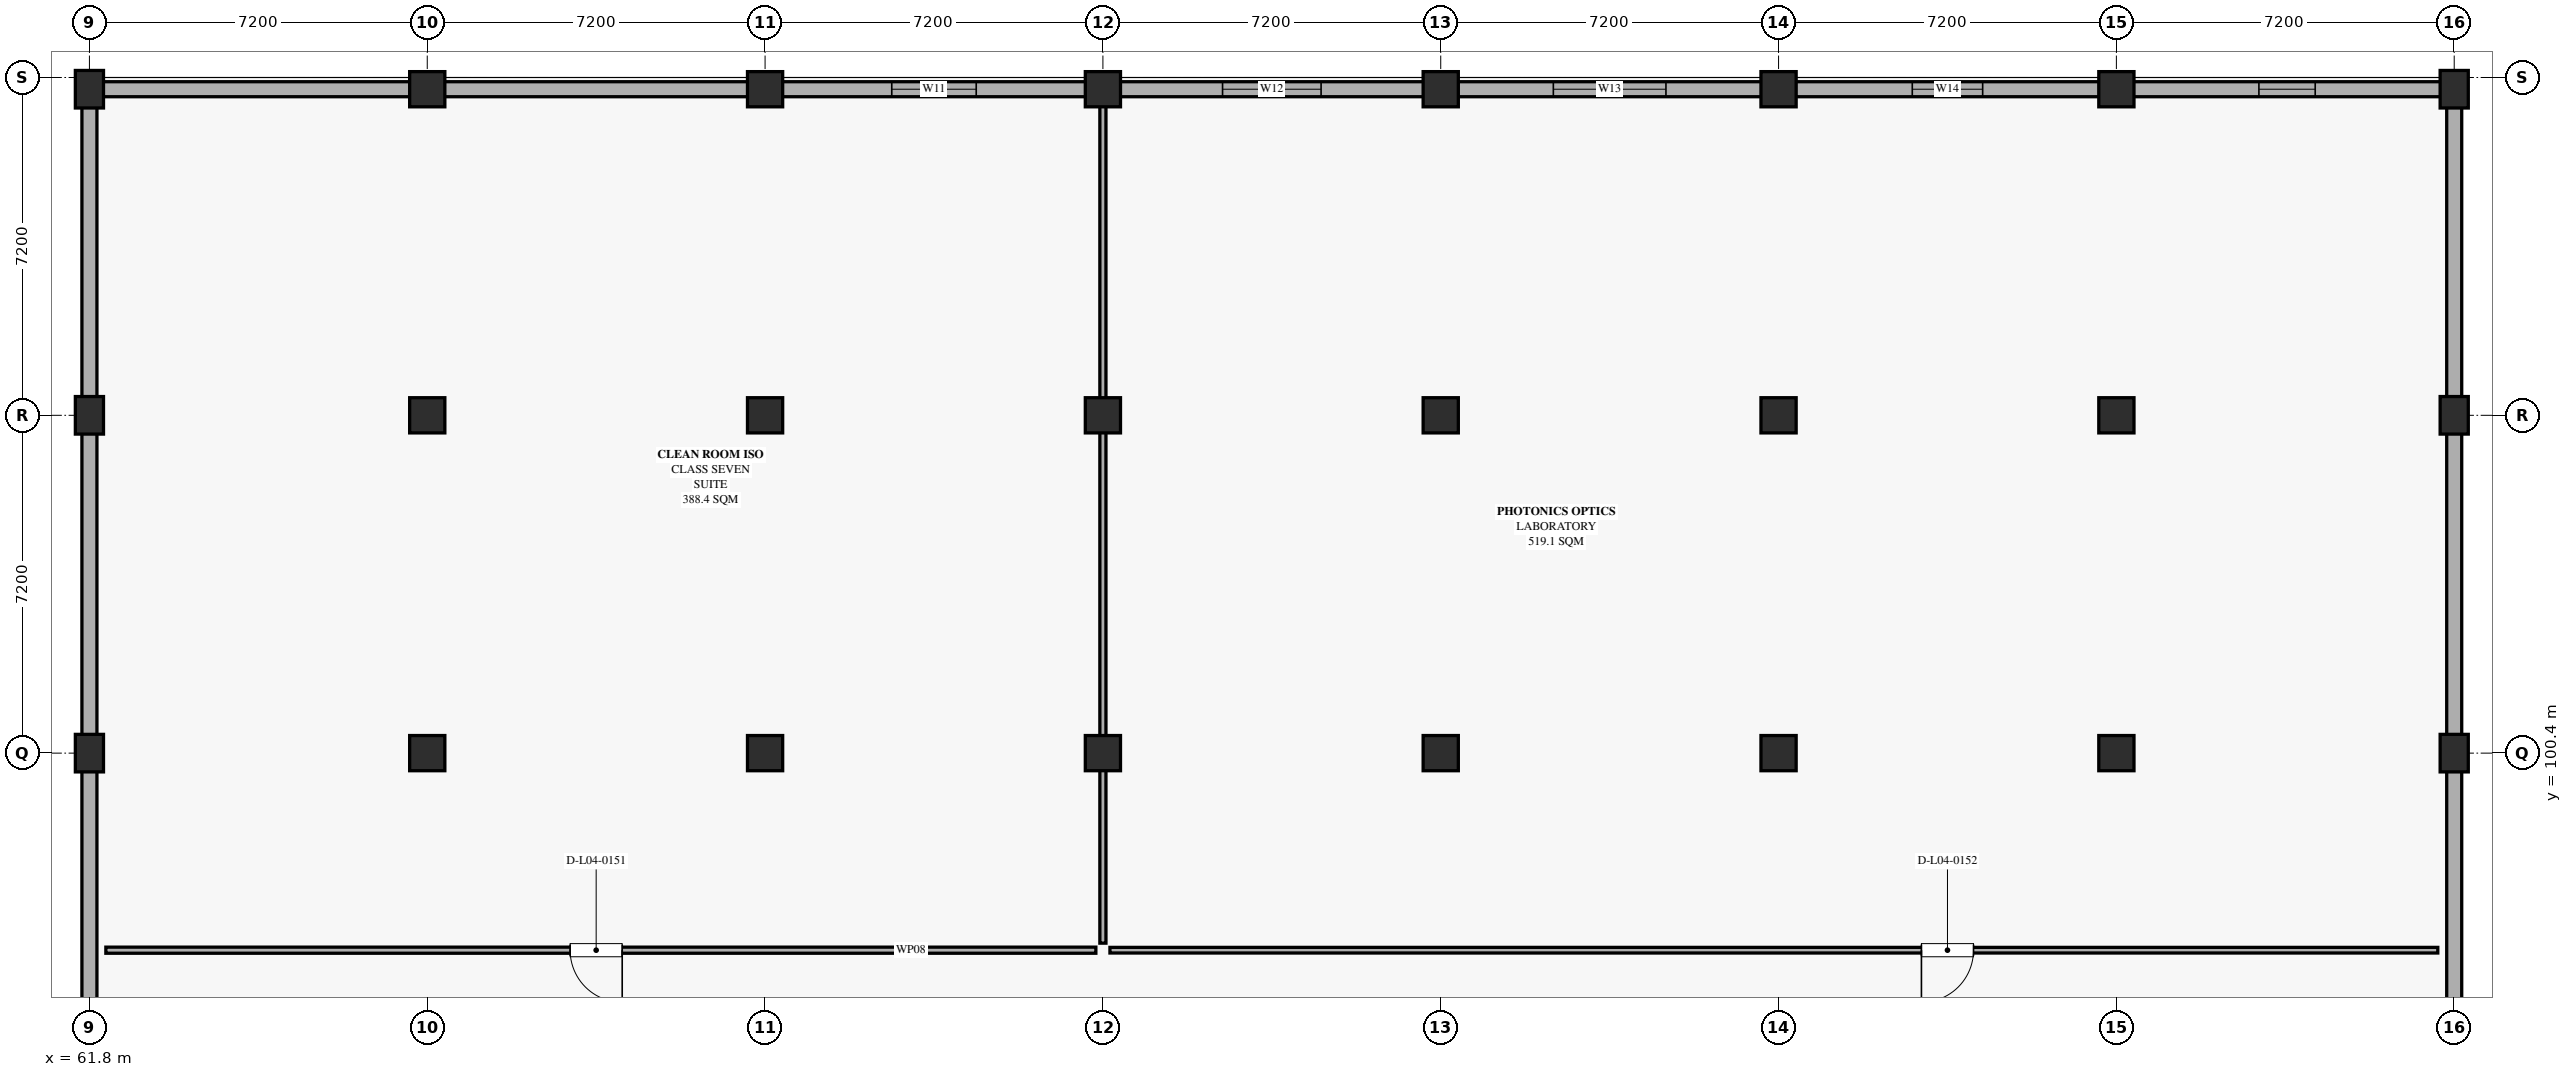
"""IFC4 building model, lengths in metres.
Left out: names, types, materials, properties, quantities, classifications, styles, units other than length and angle.
Written with IfcOpenShell. Run it as: python <this file> out.ifc"""

import sys

from ifc_helpers import new_model, si_unit, direction, frame, frame_2d, origin, origin_2d, place, context, subcontext, project, spatial, rectangle, extrude, element, fill, save


model = new_model("IFC4")
c1 = context("Model", 3, precision=1e-05, world=origin(), true_north=direction((0.0, 1.0)))
c2 = subcontext(c1, "Body", "Model", "MODEL_VIEW")
j1 = project(units=[si_unit("LENGTHUNIT", "METRE"), si_unit("PLANEANGLEUNIT", "RADIAN")], contexts=[c1])
p1 = place(None, origin())
s1 = spatial("IfcSite", under=j1, at=p1, CompositionType="ELEMENT")
p2 = place(p1, origin())
s2 = spatial("IfcBuilding", under=s1, at=p2, CompositionType="ELEMENT")
p3 = place(p2, frame((0.0, 0.0, 19.8)))
s3 = spatial("IfcBuildingStorey", under=s2, at=p3, CompositionType="ELEMENT", Elevation=19.8)
p4 = place(p3, frame((61.8, 100.4, 0.0), z_axis=(0.0, 0.0, 1.0), x_axis=(1.0, 0.0, 0.0)))
e1 = element("IfcColumn", 1, at=p4, inside=s3, PredefinedType="COLUMN", context=c2, shape_type="SweptSolid", body=[
    extrude(rectangle(XDim=0.6, YDim=0.8, at=origin_2d()), origin(), (0.0, 0.0, 1.0), 4.5),
])
for number, where, z_axis, x_axis in (
    (2, (69.0, 100.4, 0.0), (0.0, 0.0, 1.0), (1.0, 0.0, 0.0)),
    (3, (76.2, 100.4, 0.0), (0.0, 0.0, 1.0), (1.0, 0.0, 0.0)),
    (4, (83.4, 100.4, 0.0), (0.0, 0.0, 1.0), (1.0, 0.0, 0.0)),
    (5, (90.6, 100.4, 0.0), (0.0, 0.0, 1.0), (1.0, 0.0, 0.0)),
    (6, (97.8, 100.4, 0.0), (0.0, 0.0, 1.0), (1.0, 0.0, 0.0)),
    (7, (105.0, 100.4, 0.0), (0.0, 0.0, 1.0), (1.0, 0.0, 0.0)),
):
    element("IfcColumn", number, at=place(p3, frame(where, z_axis=z_axis, x_axis=x_axis)), inside=s3, PredefinedType="COLUMN", context=c2, shape_type="SweptSolid", body=[
        extrude(rectangle(XDim=0.75, YDim=0.75, at=origin_2d()), origin(), (0.0, 0.0, 1.0), 4.5),
    ])
for number, where, z_axis, x_axis in (
    (8, (112.2, 100.4, 0.0), (0.0, 0.0, 1.0), (1.0, 0.0, 0.0)),
    (9, (61.8, 107.6, 0.0), (0.0, 0.0, 1.0), (1.0, 0.0, 0.0)),
):
    element("IfcColumn", number, at=place(p3, frame(where, z_axis=z_axis, x_axis=x_axis)), inside=s3, PredefinedType="COLUMN", context=c2, shape_type="SweptSolid", body=[
        extrude(rectangle(XDim=0.6, YDim=0.8, at=origin_2d()), origin(), (0.0, 0.0, 1.0), 4.5),
    ])
for number, where, z_axis, x_axis in (
    (10, (69.0, 107.6, 0.0), (0.0, 0.0, 1.0), (1.0, 0.0, 0.0)),
    (11, (76.2, 107.6, 0.0), (0.0, 0.0, 1.0), (1.0, 0.0, 0.0)),
    (12, (83.4, 107.6, 0.0), (0.0, 0.0, 1.0), (1.0, 0.0, 0.0)),
    (13, (90.6, 107.6, 0.0), (0.0, 0.0, 1.0), (1.0, 0.0, 0.0)),
    (14, (97.8, 107.6, 0.0), (0.0, 0.0, 1.0), (1.0, 0.0, 0.0)),
    (15, (105.0, 107.6, 0.0), (0.0, 0.0, 1.0), (1.0, 0.0, 0.0)),
):
    element("IfcColumn", number, at=place(p3, frame(where, z_axis=z_axis, x_axis=x_axis)), inside=s3, PredefinedType="COLUMN", context=c2, shape_type="SweptSolid", body=[
        extrude(rectangle(XDim=0.75, YDim=0.75, at=origin_2d()), origin(), (0.0, 0.0, 1.0), 4.5),
    ])
for number, where, z_axis, x_axis in (
    (16, (112.2, 107.6, 0.0), (0.0, 0.0, 1.0), (1.0, 0.0, 0.0)),
    (17, (61.8, 114.55, 0.0), (0.0, 0.0, 1.0), (1.0, 0.0, 0.0)),
):
    element("IfcColumn", number, at=place(p3, frame(where, z_axis=z_axis, x_axis=x_axis)), inside=s3, PredefinedType="COLUMN", context=c2, shape_type="SweptSolid", body=[
        extrude(rectangle(XDim=0.6, YDim=0.8, at=origin_2d()), origin(), (0.0, 0.0, 1.0), 4.5),
    ])
for number, where, z_axis, x_axis in (
    (18, (69.0, 114.55, 0.0), (0.0, 0.0, 1.0), (1.0, 0.0, 0.0)),
    (19, (76.2, 114.55, 0.0), (0.0, 0.0, 1.0), (1.0, 0.0, 0.0)),
    (20, (83.4, 114.55, 0.0), (0.0, 0.0, 1.0), (1.0, 0.0, 0.0)),
    (21, (90.6, 114.55, 0.0), (0.0, 0.0, 1.0), (1.0, 0.0, 0.0)),
    (22, (97.8, 114.55, 0.0), (0.0, 0.0, 1.0), (1.0, 0.0, 0.0)),
    (23, (105.0, 114.55, 0.0), (0.0, 0.0, 1.0), (1.0, 0.0, 0.0)),
):
    element("IfcColumn", number, at=place(p3, frame(where, z_axis=z_axis, x_axis=x_axis)), inside=s3, PredefinedType="COLUMN", context=c2, shape_type="SweptSolid", body=[
        extrude(rectangle(XDim=0.75, YDim=0.75, at=origin_2d()), origin(), (0.0, 0.0, 1.0), 4.5),
    ])
p5 = place(p3, frame((112.2, 114.55, 0.0), z_axis=(0.0, 0.0, 1.0), x_axis=(1.0, 0.0, 0.0)))
e24 = element("IfcColumn", 24, at=p5, inside=s3, PredefinedType="COLUMN", context=c2, shape_type="SweptSolid", body=[
    extrude(rectangle(XDim=0.6, YDim=0.8, at=origin_2d()), origin(), (0.0, 0.0, 1.0), 4.5),
])
for number, where, z_axis, x_axis in (
    (25, (61.8, 93.585, 0.0), (0.0, 0.0, 1.0), (0.0, 1.0, 0.0)),
    (26, (112.2, 100.015, 0.0), (0.0, 0.0, 1.0), (0.0, -1.0, 0.0)),
):
    element("IfcWall", number, at=place(p3, frame(where, z_axis=z_axis, x_axis=x_axis)), inside=s3, PredefinedType="SOLIDWALL", context=c2, shape_type="SweptSolid", body=[
        extrude(rectangle(XDim=6.43, YDim=0.32, at=frame_2d((3.215, 0.0))), origin(), (0.0, 0.0, 1.0), 3.0),
    ])
for number, where, z_axis, x_axis in (
    (27, (61.8, 100.785, 0.0), (0.0, 0.0, 1.0), (0.0, 1.0, 0.0)),
    (28, (112.2, 107.215, 0.0), (0.0, 0.0, 1.0), (0.0, -1.0, 0.0)),
):
    element("IfcWall", number, at=place(p3, frame(where, z_axis=z_axis, x_axis=x_axis)), inside=s3, PredefinedType="SOLIDWALL", context=c2, shape_type="SweptSolid", body=[
        extrude(rectangle(XDim=6.43, YDim=0.32, at=frame_2d((3.215, 0.0))), origin(), (0.0, 0.0, 1.0), 3.0),
    ])
for number, where, z_axis, x_axis in (
    (29, (61.8, 107.985, 0.0), (0.0, 0.0, 1.0), (0.0, 1.0, 0.0)),
    (30, (112.2, 114.165, 0.0), (0.0, 0.0, 1.0), (0.0, -1.0, 0.0)),
):
    element("IfcWall", number, at=place(p3, frame(where, z_axis=z_axis, x_axis=x_axis)), inside=s3, PredefinedType="SOLIDWALL", context=c2, shape_type="SweptSolid", body=[
        extrude(rectangle(XDim=6.18, YDim=0.32, at=frame_2d((3.09, 0.0))), origin(), (0.0, 0.0, 1.0), 3.0),
    ])
p6 = place(p3, frame((62.085, 114.55, 0.0), z_axis=(0.0, 0.0, 1.0), x_axis=(1.0, 0.0, 0.0)))
e31 = element("IfcWall", 31, at=p6, inside=s3, PredefinedType="SOLIDWALL", context=c2, shape_type="SweptSolid", body=[
    extrude(rectangle(XDim=6.555, YDim=0.32, at=frame_2d((3.277, 0.0))), origin(), (0.0, 0.0, 1.0), 3.0),
])
p7 = place(p3, frame((69.36, 114.55, 0.0), z_axis=(0.0, 0.0, 1.0), x_axis=(1.0, 0.0, 0.0)))
e32 = element("IfcWall", 32, at=p7, inside=s3, PredefinedType="SOLIDWALL", context=c2, shape_type="SweptSolid", body=[
    extrude(rectangle(XDim=6.48, YDim=0.32, at=frame_2d((3.24, 0.0))), origin(), (0.0, 0.0, 1.0), 3.0),
])
p8 = place(p3, frame((76.56, 114.55, 0.0), z_axis=(0.0, 0.0, 1.0), x_axis=(1.0, 0.0, 0.0)))
e33 = element("IfcWall", 33, at=p8, inside=s3, PredefinedType="SOLIDWALL", context=c2, shape_type="SweptSolid", body=[
    extrude(rectangle(XDim=6.48, YDim=0.32, at=frame_2d((3.24, 0.0))), origin(), (0.0, 0.0, 1.0), 3.0),
])
p9 = place(p8, frame((2.34, 0.0, 0.85)))
e34 = element("IfcOpeningElement", 34, at=p9, cuts=e33, PredefinedType="OPENING", context=c2, shape_type="SweptSolid", body=[
    extrude(rectangle(XDim=1.8, YDim=1.8, at=frame_2d((0.9, 0.9))), frame((0.0, 0.17, 0.0), z_axis=(0.0, -1.0, 0.0), x_axis=(1.0, 0.0, 0.0)), (0.0, 0.0, 1.0), 0.34),
])
p10 = place(p3, frame((83.76, 114.55, 0.0), z_axis=(0.0, 0.0, 1.0), x_axis=(1.0, 0.0, 0.0)))
e35 = element("IfcWall", 35, at=p10, inside=s3, PredefinedType="SOLIDWALL", context=c2, shape_type="SweptSolid", body=[
    extrude(rectangle(XDim=6.48, YDim=0.32, at=frame_2d((3.24, 0.0))), origin(), (0.0, 0.0, 1.0), 3.0),
])
p11 = place(p10, frame((2.19, 0.0, 0.85)))
e36 = element("IfcOpeningElement", 36, at=p11, cuts=e35, PredefinedType="OPENING", context=c2, shape_type="SweptSolid", body=[
    extrude(rectangle(XDim=2.1, YDim=1.8, at=frame_2d((1.05, 0.9))), frame((0.0, 0.17, 0.0), z_axis=(0.0, -1.0, 0.0), x_axis=(1.0, 0.0, 0.0)), (0.0, 0.0, 1.0), 0.34),
])
p12 = place(p3, frame((90.96, 114.55, 0.0), z_axis=(0.0, 0.0, 1.0), x_axis=(1.0, 0.0, 0.0)))
e37 = element("IfcWall", 37, at=p12, inside=s3, PredefinedType="SOLIDWALL", context=c2, shape_type="SweptSolid", body=[
    extrude(rectangle(XDim=6.48, YDim=0.32, at=frame_2d((3.24, 0.0))), origin(), (0.0, 0.0, 1.0), 3.0),
])
p13 = place(p12, frame((2.04, 0.0, 0.85)))
e38 = element("IfcOpeningElement", 38, at=p13, cuts=e37, PredefinedType="OPENING", context=c2, shape_type="SweptSolid", body=[
    extrude(rectangle(XDim=2.4, YDim=1.8, at=frame_2d((1.2, 0.9))), frame((0.0, 0.17, 0.0), z_axis=(0.0, -1.0, 0.0), x_axis=(1.0, 0.0, 0.0)), (0.0, 0.0, 1.0), 0.34),
])
p14 = place(p3, frame((98.16, 114.55, 0.0), z_axis=(0.0, 0.0, 1.0), x_axis=(1.0, 0.0, 0.0)))
e39 = element("IfcWall", 39, at=p14, inside=s3, PredefinedType="SOLIDWALL", context=c2, shape_type="SweptSolid", body=[
    extrude(rectangle(XDim=6.48, YDim=0.32, at=frame_2d((3.24, 0.0))), origin(), (0.0, 0.0, 1.0), 3.0),
])
p15 = place(p14, frame((2.49, 0.0, 0.85)))
e40 = element("IfcOpeningElement", 40, at=p15, cuts=e39, PredefinedType="OPENING", context=c2, shape_type="SweptSolid", body=[
    extrude(rectangle(XDim=1.5, YDim=1.8, at=frame_2d((0.75, 0.9))), frame((0.0, 0.17, 0.0), z_axis=(0.0, -1.0, 0.0), x_axis=(1.0, 0.0, 0.0)), (0.0, 0.0, 1.0), 0.34),
])
p16 = place(p3, frame((105.36, 114.55, 0.0), z_axis=(0.0, 0.0, 1.0), x_axis=(1.0, 0.0, 0.0)))
e41 = element("IfcWall", 41, at=p16, inside=s3, PredefinedType="SOLIDWALL", context=c2, shape_type="SweptSolid", body=[
    extrude(rectangle(XDim=6.555, YDim=0.32, at=frame_2d((3.277, 0.0))), origin(), (0.0, 0.0, 1.0), 3.0),
])
p17 = place(p16, frame((2.677, 0.0, 0.85)))
e42 = element("IfcOpeningElement", 42, at=p17, cuts=e41, PredefinedType="OPENING", context=c2, shape_type="SweptSolid", body=[
    extrude(rectangle(XDim=1.2, YDim=1.8, at=frame_2d((0.6, 0.9))), frame((0.0, 0.17, 0.0), z_axis=(0.0, -1.0, 0.0), x_axis=(1.0, 0.0, 0.0)), (0.0, 0.0, 1.0), 0.34),
])
p18 = place(p3, frame((83.25, 96.2, 0.0), z_axis=(0.0, 0.0, 1.0), x_axis=(-1.0, 0.0, 0.0)))
e43 = element("IfcWall", 43, at=p18, inside=s3, PredefinedType="PARTITIONING", context=c2, shape_type="SweptSolid", body=[
    extrude(rectangle(XDim=21.1, YDim=0.13, at=frame_2d((10.55, 0.0))), origin(), (0.0, 0.0, 1.0), 2.98),
])
p19 = place(p18, frame((10.095, 0.0, 0.0)))
e44 = element("IfcOpeningElement", 44, at=p19, cuts=e43, PredefinedType="OPENING", context=c2, shape_type="SweptSolid", body=[
    extrude(rectangle(XDim=1.11, YDim=2.16, at=frame_2d((0.555, 1.08))), frame((0.0, 0.075, 0.0), z_axis=(0.0, -1.0, 0.0), x_axis=(1.0, 0.0, 0.0)), (0.0, 0.0, 1.0), 0.15),
])
p20 = place(p3, frame((83.4, 114.2, 0.0), z_axis=(0.0, 0.0, 1.0), x_axis=(0.0, -1.0, 0.0)))
e45 = element("IfcWall", 45, at=p20, inside=s3, PredefinedType="PARTITIONING", context=c2, shape_type="SweptSolid", body=[
    extrude(rectangle(XDim=17.85, YDim=0.13, at=frame_2d((8.925, 0.0))), origin(), (0.0, 0.0, 1.0), 2.98),
])
p21 = place(p3, frame((111.85, 96.2, 0.0), z_axis=(0.0, 0.0, 1.0), x_axis=(-1.0, 0.0, 0.0)))
e46 = element("IfcWall", 46, at=p21, inside=s3, PredefinedType="PARTITIONING", context=c2, shape_type="SweptSolid", body=[
    extrude(rectangle(XDim=28.3, YDim=0.12, at=frame_2d((14.15, 0.0))), origin(), (0.0, 0.0, 1.0), 2.98),
])
p22 = place(p21, frame((9.895, 0.0, 0.0)))
e47 = element("IfcOpeningElement", 47, at=p22, cuts=e46, PredefinedType="OPENING", context=c2, shape_type="SweptSolid", body=[
    extrude(rectangle(XDim=1.11, YDim=2.22, at=frame_2d((0.555, 1.11))), frame((0.0, 0.07, 0.0), z_axis=(0.0, -1.0, 0.0), x_axis=(1.0, 0.0, 0.0)), (0.0, 0.0, 1.0), 0.14),
])
p23 = place(p9, origin())
e48 = element("IfcWindow", 48, at=p23, inside=s3, PartitioningType="DOUBLE_PANEL_VERTICAL", PredefinedType="WINDOW", context=c2, shape_type="SweptSolid", body=[
    extrude(rectangle(XDim=1.8, YDim=1.8, at=frame_2d((0.9, 0.9))), frame((0.0, 0.03, 0.0), z_axis=(0.0, -1.0, 0.0), x_axis=(1.0, 0.0, 0.0)), (0.0, 0.0, 1.0), 0.06),
])
fill(e34, e48)
p24 = place(p11, origin())
e49 = element("IfcWindow", 49, at=p24, inside=s3, PartitioningType="DOUBLE_PANEL_VERTICAL", PredefinedType="WINDOW", context=c2, shape_type="SweptSolid", body=[
    extrude(rectangle(XDim=2.1, YDim=1.8, at=frame_2d((1.05, 0.9))), frame((0.0, 0.03, 0.0), z_axis=(0.0, -1.0, 0.0), x_axis=(1.0, 0.0, 0.0)), (0.0, 0.0, 1.0), 0.06),
])
fill(e36, e49)
p25 = place(p13, origin())
e50 = element("IfcWindow", 50, at=p25, inside=s3, PartitioningType="DOUBLE_PANEL_VERTICAL", PredefinedType="WINDOW", context=c2, shape_type="SweptSolid", body=[
    extrude(rectangle(XDim=2.4, YDim=1.8, at=frame_2d((1.2, 0.9))), frame((0.0, 0.03, 0.0), z_axis=(0.0, -1.0, 0.0), x_axis=(1.0, 0.0, 0.0)), (0.0, 0.0, 1.0), 0.06),
])
fill(e38, e50)
p26 = place(p15, origin())
e51 = element("IfcWindow", 51, at=p26, inside=s3, PartitioningType="SINGLE_PANEL", PredefinedType="WINDOW", context=c2, shape_type="SweptSolid", body=[
    extrude(rectangle(XDim=1.5, YDim=1.8, at=frame_2d((0.75, 0.9))), frame((0.0, 0.03, 0.0), z_axis=(0.0, -1.0, 0.0), x_axis=(1.0, 0.0, 0.0)), (0.0, 0.0, 1.0), 0.06),
])
fill(e40, e51)
p27 = place(p17, origin())
e52 = element("IfcWindow", 52, at=p27, inside=s3, PartitioningType="SINGLE_PANEL", PredefinedType="WINDOW", context=c2, shape_type="SweptSolid", body=[
    extrude(rectangle(XDim=1.2, YDim=1.8, at=frame_2d((0.6, 0.9))), frame((0.0, 0.03, 0.0), z_axis=(0.0, -1.0, 0.0), x_axis=(1.0, 0.0, 0.0)), (0.0, 0.0, 1.0), 0.06),
])
fill(e42, e52)
p28 = place(p19, origin())
e53 = element("IfcDoor", 53, at=p28, inside=s3, OperationType="SINGLE_SWING_LEFT", PredefinedType="DOOR", context=c2, shape_type="SweptSolid", body=[
    extrude(rectangle(XDim=1.11, YDim=2.16, at=frame_2d((0.555, 1.08))), frame((0.0, 0.025, 0.0), z_axis=(0.0, -1.0, 0.0), x_axis=(1.0, 0.0, 0.0)), (0.0, 0.0, 1.0), 0.05),
])
fill(e44, e53)
p29 = place(p22, origin())
e54 = element("IfcDoor", 54, at=p29, inside=s3, OperationType="SINGLE_SWING_RIGHT", PredefinedType="DOOR", context=c2, shape_type="SweptSolid", body=[
    extrude(rectangle(XDim=1.11, YDim=2.22, at=frame_2d((0.555, 1.11))), frame((0.0, 0.025, 0.0), z_axis=(0.0, -1.0, 0.0), x_axis=(1.0, 0.0, 0.0)), (0.0, 0.0, 1.0), 0.05),
])
fill(e47, e54)
save(model, sys.argv[1])
